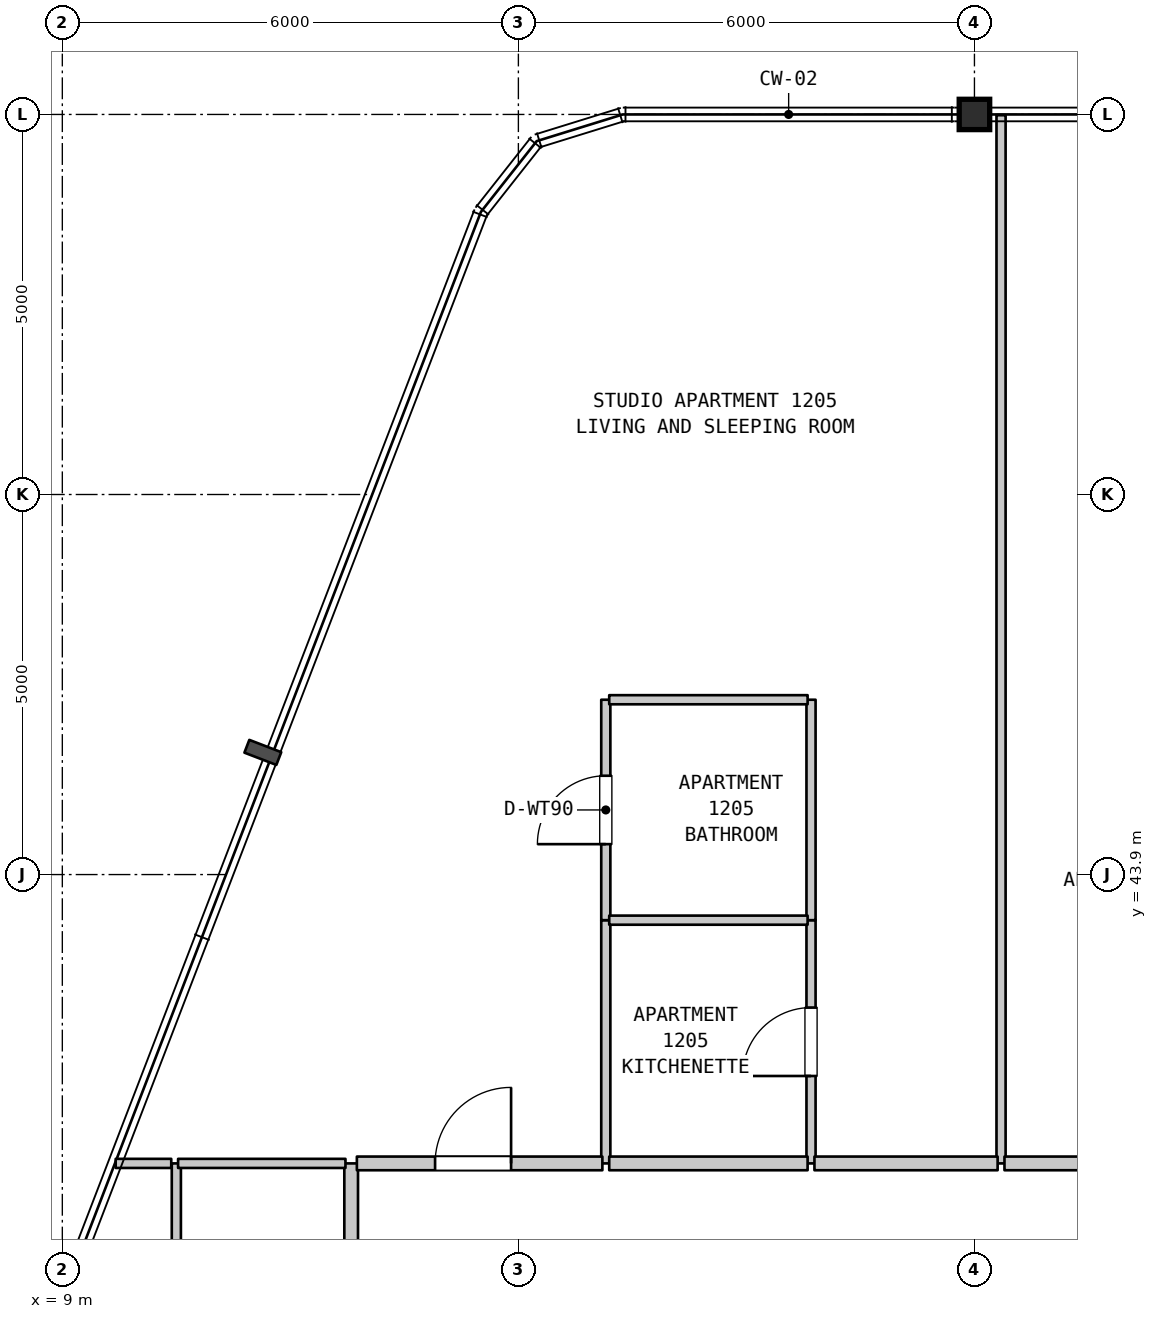
"""IFC4 building model, lengths in metres.
Left out: names, types, materials, properties, quantities, classifications, styles, units other than length and angle.
Written with IfcOpenShell. Run it as: python <this file> out.ifc"""

import sys

from ifc_helpers import new_model, si_unit, direction, frame, frame_2d, origin, origin_2d, place, context, subcontext, project, spatial, rectangle, i_section, extrude, element, fill, save


model = new_model("IFC4")
c1 = context("Model", 3, precision=1e-05, world=origin(), true_north=direction((0.0, 1.0)))
c2 = subcontext(c1, "Body", "Model", "MODEL_VIEW")
j1 = project(units=[si_unit("LENGTHUNIT", "METRE"), si_unit("PLANEANGLEUNIT", "RADIAN")], contexts=[c1])
p1 = place(None, origin())
s1 = spatial("IfcSite", under=j1, at=p1, CompositionType="ELEMENT")
p2 = place(p1, origin())
s2 = spatial("IfcBuilding", under=s1, at=p2, CompositionType="ELEMENT")
p3 = place(p2, frame((0.0, 0.0, 53.6)))
s3 = spatial("IfcBuildingStorey", under=s2, at=p3, CompositionType="ELEMENT", Elevation=53.6)
p4 = place(p3, frame((21.0, 53.9, 0.0), z_axis=(0.0, 0.0, 1.0), x_axis=(1.0, 0.0, 0.0)))
e1 = element("IfcColumn", 1, at=p4, inside=s3, PredefinedType="COLUMN", context=c2, shape_type="SweptSolid", body=[
    extrude(i_section(OverallWidth=0.401, OverallDepth=0.399, WebThickness=0.025, FlangeThickness=0.04, FilletRadius=0.015, at=origin_2d()), origin(), (0.0, 0.0, 1.0), 3.7),
])
p5 = place(p3, frame((10.5, 32.36, 0.0), z_axis=(0.0, 0.0, 1.0), x_axis=(0.0, 1.0, 0.0)))
e2 = element("IfcWall", 2, at=p5, inside=s3, PredefinedType="PARTITIONING", context=c2, shape_type="SweptSolid", body=[
    extrude(rectangle(XDim=7.74, YDim=0.12, at=frame_2d((3.87, 0.0))), origin(), (0.0, 0.0, 1.0), 3.385),
])
p6 = place(p3, frame((12.8, 32.36, 0.0), z_axis=(0.0, 0.0, 1.0), x_axis=(0.0, 1.0, 0.0)))
e3 = element("IfcWall", 3, at=p6, inside=s3, PredefinedType="STANDARD", context=c2, shape_type="SweptSolid", body=[
    extrude(rectangle(XDim=7.74, YDim=0.18, at=frame_2d((3.87, 0.0))), origin(), (0.0, 0.0, 1.0), 3.385),
])
p7 = place(p3, frame((16.15, 40.1, 0.0), z_axis=(0.0, 0.0, 1.0), x_axis=(0.0, 1.0, 0.0)))
e4 = element("IfcWall", 4, at=p7, inside=s3, PredefinedType="PARTITIONING", context=c2, shape_type="SweptSolid", body=[
    extrude(rectangle(XDim=3.2, YDim=0.12, at=frame_2d((1.6, 0.0))), origin(), (0.0, 0.0, 1.0), 3.385),
])
p8 = place(p3, frame((16.15, 43.3, 0.0), z_axis=(0.0, 0.0, 1.0), x_axis=(0.0, 1.0, 0.0)))
e5 = element("IfcWall", 5, at=p8, inside=s3, PredefinedType="PARTITIONING", context=c2, shape_type="SweptSolid", body=[
    extrude(rectangle(XDim=2.9, YDim=0.12, at=frame_2d((1.45, 0.0))), origin(), (0.0, 0.0, 1.0), 3.385),
])
p9 = place(p8, frame((1.0, 0.0, 0.0)))
e6 = element("IfcOpeningElement", 6, at=p9, cuts=e5, PredefinedType="OPENING", context=c2, shape_type="SweptSolid", body=[
    extrude(rectangle(XDim=0.9, YDim=2.1, at=frame_2d((0.45, 1.05))), frame((0.0, 0.07, 0.0), z_axis=(0.0, -1.0, 0.0), x_axis=(1.0, 0.0, 0.0)), (0.0, 0.0, 1.0), 0.14),
])
p10 = place(p3, frame((18.85, 40.1, 0.0), z_axis=(0.0, 0.0, 1.0), x_axis=(0.0, 1.0, 0.0)))
e7 = element("IfcWall", 7, at=p10, inside=s3, PredefinedType="PARTITIONING", context=c2, shape_type="SweptSolid", body=[
    extrude(rectangle(XDim=3.2, YDim=0.12, at=frame_2d((1.6, 0.0))), origin(), (0.0, 0.0, 1.0), 3.385),
])
p11 = place(p10, frame((1.15, 0.0, 0.0)))
e8 = element("IfcOpeningElement", 8, at=p11, cuts=e7, PredefinedType="OPENING", context=c2, shape_type="SweptSolid", body=[
    extrude(rectangle(XDim=0.9, YDim=2.15, at=frame_2d((0.45, 1.075))), frame((0.0, 0.07, 0.0), z_axis=(0.0, -1.0, 0.0), x_axis=(1.0, 0.0, 0.0)), (0.0, 0.0, 1.0), 0.14),
])
p12 = place(p3, frame((18.85, 43.3, 0.0), z_axis=(0.0, 0.0, 1.0), x_axis=(0.0, 1.0, 0.0)))
e9 = element("IfcWall", 9, at=p12, inside=s3, PredefinedType="PARTITIONING", context=c2, shape_type="SweptSolid", body=[
    extrude(rectangle(XDim=2.9, YDim=0.12, at=frame_2d((1.45, 0.0))), origin(), (0.0, 0.0, 1.0), 3.385),
])
p13 = place(p3, frame((21.35, 40.1, 0.0), z_axis=(0.0, 0.0, 1.0), x_axis=(0.0, 1.0, 0.0)))
e10 = element("IfcWall", 10, at=p13, inside=s3, PredefinedType="PARTITIONING", context=c2, shape_type="SweptSolid", body=[
    extrude(rectangle(XDim=13.79, YDim=0.12, at=frame_2d((6.895, 0.0))), origin(), (0.0, 0.0, 1.0), 3.385),
])
p14 = place(p3, frame((9.702, 40.1, 0.0), z_axis=(0.0, 0.0, 1.0), x_axis=(1.0, 0.0, 0.0)))
e11 = element("IfcWall", 11, at=p14, inside=s3, PredefinedType="PARTITIONING", context=c2, shape_type="SweptSolid", body=[
    extrude(rectangle(XDim=0.731, YDim=0.12, at=frame_2d((0.366, 0.0))), origin(), (0.0, 0.0, 1.0), 3.385),
])
p15 = place(p3, frame((10.523, 40.1, 0.0), z_axis=(0.0, 0.0, 1.0), x_axis=(1.0, 0.0, 0.0)))
e12 = element("IfcWall", 12, at=p15, inside=s3, PredefinedType="PARTITIONING", context=c2, shape_type="SweptSolid", body=[
    extrude(rectangle(XDim=2.202, YDim=0.12, at=frame_2d((1.101, 0.0))), origin(), (0.0, 0.0, 1.0), 3.385),
])
p16 = place(p3, frame((12.875, 40.1, 0.0), z_axis=(0.0, 0.0, 1.0), x_axis=(1.0, 0.0, 0.0)))
e13 = element("IfcWall", 13, at=p16, inside=s3, PredefinedType="STANDARD", context=c2, shape_type="SweptSolid", body=[
    extrude(rectangle(XDim=3.23, YDim=0.18, at=frame_2d((1.615, 0.0))), origin(), (0.0, 0.0, 1.0), 3.385),
])
p17 = place(p16, frame((1.029, 0.0, 0.0)))
e14 = element("IfcOpeningElement", 14, at=p17, cuts=e13, PredefinedType="OPENING", context=c2, shape_type="SweptSolid", body=[
    extrude(rectangle(XDim=1.0, YDim=2.15, at=frame_2d((0.5, 1.075))), frame((0.0, 0.1, 0.0), z_axis=(0.0, -1.0, 0.0), x_axis=(1.0, 0.0, 0.0)), (0.0, 0.0, 1.0), 0.2),
])
p18 = place(p3, frame((16.195, 40.1, 0.0), z_axis=(0.0, 0.0, 1.0), x_axis=(1.0, 0.0, 0.0)))
e15 = element("IfcWall", 15, at=p18, inside=s3, PredefinedType="STANDARD", context=c2, shape_type="SweptSolid", body=[
    extrude(rectangle(XDim=2.61, YDim=0.18, at=frame_2d((1.305, 0.0))), origin(), (0.0, 0.0, 1.0), 3.385),
])
p19 = place(p3, frame((18.895, 40.1, 0.0), z_axis=(0.0, 0.0, 1.0), x_axis=(1.0, 0.0, 0.0)))
e16 = element("IfcWall", 16, at=p19, inside=s3, PredefinedType="STANDARD", context=c2, shape_type="SweptSolid", body=[
    extrude(rectangle(XDim=2.41, YDim=0.18, at=frame_2d((1.205, 0.0))), origin(), (0.0, 0.0, 1.0), 3.385),
])
p20 = place(p3, frame((21.395, 40.1, 0.0), z_axis=(0.0, 0.0, 1.0), x_axis=(1.0, 0.0, 0.0)))
e17 = element("IfcWall", 17, at=p20, inside=s3, PredefinedType="STANDARD", context=c2, shape_type="SweptSolid", body=[
    extrude(rectangle(XDim=4.42, YDim=0.18, at=frame_2d((2.21, 0.0))), origin(), (0.0, 0.0, 1.0), 3.385),
])
p21 = place(p20, frame((1.638, 0.0, 0.0)))
e18 = element("IfcOpeningElement", 18, at=p21, cuts=e17, PredefinedType="OPENING", context=c2, shape_type="SweptSolid", body=[
    extrude(rectangle(XDim=1.0, YDim=2.15, at=frame_2d((0.5, 1.075))), frame((0.0, 0.1, 0.0), z_axis=(0.0, -1.0, 0.0), x_axis=(1.0, 0.0, 0.0)), (0.0, 0.0, 1.0), 0.2),
])
for number, where, z_axis, x_axis in (
    (19, (16.195, 43.3, 0.0), (0.0, 0.0, 1.0), (1.0, 0.0, 0.0)),
    (20, (16.195, 46.2, 0.0), (0.0, 0.0, 1.0), (1.0, 0.0, 0.0)),
):
    element("IfcWall", number, at=place(p3, frame(where, z_axis=z_axis, x_axis=x_axis)), inside=s3, PredefinedType="PARTITIONING", context=c2, shape_type="SweptSolid", body=[
        extrude(rectangle(XDim=2.61, YDim=0.12, at=frame_2d((1.305, 0.0))), origin(), (0.0, 0.0, 1.0), 3.385),
    ])
p22 = place(p9, origin())
e21 = element("IfcDoor", 21, at=p22, inside=s3, OperationType="SINGLE_SWING_LEFT", PredefinedType="DOOR", context=c2, shape_type="SweptSolid", body=[
    extrude(rectangle(XDim=0.9, YDim=2.1, at=frame_2d((0.45, 1.05))), frame((0.0, 0.025, 0.0), z_axis=(0.0, -1.0, 0.0), x_axis=(1.0, 0.0, 0.0)), (0.0, 0.0, 1.0), 0.05),
])
fill(e6, e21)
p23 = place(p11, origin())
e22 = element("IfcDoor", 22, at=p23, inside=s3, OperationType="SINGLE_SWING_LEFT", PredefinedType="DOOR", context=c2, shape_type="SweptSolid", body=[
    extrude(rectangle(XDim=0.9, YDim=2.15, at=frame_2d((0.45, 1.075))), frame((0.0, 0.025, 0.0), z_axis=(0.0, -1.0, 0.0), x_axis=(1.0, 0.0, 0.0)), (0.0, 0.0, 1.0), 0.05),
])
fill(e8, e22)
p24 = place(p17, origin())
e23 = element("IfcDoor", 23, at=p24, inside=s3, OperationType="SINGLE_SWING_RIGHT", PredefinedType="DOOR", context=c2, shape_type="SweptSolid", body=[
    extrude(rectangle(XDim=1.0, YDim=2.15, at=frame_2d((0.5, 1.075))), frame((0.0, 0.025, 0.0), z_axis=(0.0, -1.0, 0.0), x_axis=(1.0, 0.0, 0.0)), (0.0, 0.0, 1.0), 0.05),
])
fill(e14, e23)
save(model, sys.argv[1])
